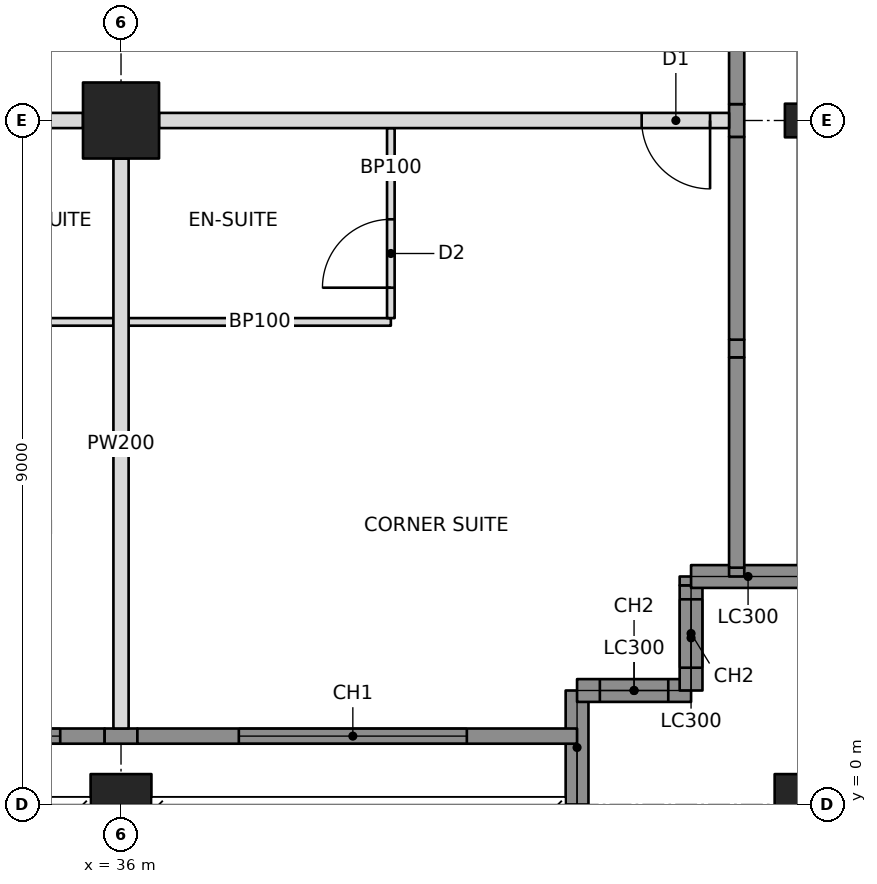
"""IFC4 building model, lengths in metres.
Left out: names, types, materials, properties, quantities, classifications, styles, units other than length and angle.
Written with IfcOpenShell. Run it as: python <this file> out.ifc"""

import sys

from ifc_helpers import new_model, si_unit, direction, frame, frame_2d, origin, origin_2d, place, context, subcontext, project, spatial, rectangle, hollow_rectangle, i_section, extrude, element, fill, save


model = new_model("IFC4")
c1 = context("Model", 3, precision=1e-05, world=origin(), true_north=direction((0.0, 1.0)))
c2 = subcontext(c1, "Body", "Model", "MODEL_VIEW")
j1 = project(units=[si_unit("LENGTHUNIT", "METRE"), si_unit("PLANEANGLEUNIT", "RADIAN")], contexts=[c1])
p1 = place(None, origin())
s1 = spatial("IfcSite", under=j1, at=p1, CompositionType="ELEMENT")
p2 = place(p1, origin())
s2 = spatial("IfcBuilding", under=s1, at=p2, CompositionType="ELEMENT")
p3 = place(p2, frame((0.0, 0.0, 152.0)))
s3 = spatial("IfcBuildingStorey", under=s2, at=p3, CompositionType="ELEMENT", Elevation=152.0)
p4 = place(p3, frame((36.0, 0.0, 0.0), z_axis=(0.0, 0.0, 1.0), x_axis=(1.0, 0.0, 0.0)))
e1 = element("IfcColumn", 1, at=p4, inside=s3, PredefinedType="COLUMN", context=c2, shape_type="SweptSolid", body=[
    extrude(hollow_rectangle(XDim=0.8, YDim=0.8, WallThickness=0.06, at=origin_2d()), origin(), (0.0, 0.0, 1.0), 3.4),
])
p5 = place(p3, frame((36.0, 9.0, 0.0), z_axis=(0.0, 0.0, 1.0), x_axis=(0.0, 1.0, 0.0)))
e2 = element("IfcColumn", 2, at=p5, inside=s3, PredefinedType="COLUMN", context=c2, shape_type="SweptSolid", body=[
    extrude(hollow_rectangle(XDim=1.0, YDim=1.0, WallThickness=0.1, at=origin_2d()), origin(), (0.0, 0.0, 1.0), 3.4),
])
p6 = place(p3, frame((45.0, 0.0, 0.0), z_axis=(0.0, 0.0, 1.0), x_axis=(1.0, 0.0, 0.0)))
e3 = element("IfcColumn", 3, at=p6, inside=s3, PredefinedType="COLUMN", context=c2, shape_type="SweptSolid", body=[
    extrude(hollow_rectangle(XDim=0.8, YDim=0.8, WallThickness=0.06, at=origin_2d()), origin(), (0.0, 0.0, 1.0), 3.4),
])
p7 = place(p3, frame((45.0, 9.0, 0.0), z_axis=(0.0, 0.0, 1.0), x_axis=(0.0, 1.0, 0.0)))
e4 = element("IfcColumn", 4, at=p7, inside=s3, PredefinedType="COLUMN", context=c2, shape_type="SweptSolid", body=[
    extrude(i_section(OverallWidth=0.442, OverallDepth=0.531, WebThickness=0.066, FlangeThickness=0.106, at=origin_2d()), origin(), (0.0, 0.0, 1.0), 3.4),
])
p8 = place(p3, frame((42.0, 0.0, 0.0), z_axis=(0.0, 0.0, 1.0), x_axis=(0.0, 1.0, 0.0)))
e5 = element("IfcWall", 5, at=p8, inside=s3, PredefinedType="SOLIDWALL", context=c2, shape_type="SweptSolid", body=[
    extrude(rectangle(XDim=1.5, YDim=0.3, at=frame_2d((0.75, 0.0))), origin(), (0.0, 0.0, 1.0), 2.202),
])
p9 = place(p3, frame((42.0, 1.5, 0.0), z_axis=(0.0, 0.0, 1.0), x_axis=(1.0, 0.0, 0.0)))
e6 = element("IfcWall", 6, at=p9, inside=s3, PredefinedType="SOLIDWALL", context=c2, shape_type="SweptSolid", body=[
    extrude(rectangle(XDim=1.5, YDim=0.3, at=frame_2d((0.75, 0.0))), origin(), (0.0, 0.0, 1.0), 3.15),
])
p10 = place(p9, frame((0.3, 0.0, 0.6)))
e7 = element("IfcOpeningElement", 7, at=p10, cuts=e6, PredefinedType="OPENING", context=c2, shape_type="SweptSolid", body=[
    extrude(rectangle(XDim=0.9, YDim=2.2, at=frame_2d((0.45, 1.1))), frame((0.0, 0.16, 0.0), z_axis=(0.0, -1.0, 0.0), x_axis=(1.0, 0.0, 0.0)), (0.0, 0.0, 1.0), 0.32),
])
p11 = place(p3, frame((43.5, 1.5, 0.0), z_axis=(0.0, 0.0, 1.0), x_axis=(0.0, 1.0, 0.0)))
e8 = element("IfcWall", 8, at=p11, inside=s3, PredefinedType="SOLIDWALL", context=c2, shape_type="SweptSolid", body=[
    extrude(rectangle(XDim=1.384, YDim=0.3, at=frame_2d((0.692, 0.0))), origin(), (0.0, 0.0, 1.0), 3.15),
])
p12 = place(p11, frame((0.3, 0.0, 0.6)))
e9 = element("IfcOpeningElement", 9, at=p12, cuts=e8, PredefinedType="OPENING", context=c2, shape_type="SweptSolid", body=[
    extrude(rectangle(XDim=0.9, YDim=2.2, at=frame_2d((0.45, 1.1))), frame((0.0, 0.16, 0.0), z_axis=(0.0, -1.0, 0.0), x_axis=(1.0, 0.0, 0.0)), (0.0, 0.0, 1.0), 0.32),
])
p13 = place(p3, frame((43.5, 3.0, 0.0), z_axis=(0.0, 0.0, 1.0), x_axis=(1.0, 0.0, 0.0)))
e10 = element("IfcWall", 10, at=p13, inside=s3, PredefinedType="SOLIDWALL", context=c2, shape_type="SweptSolid", body=[
    extrude(rectangle(XDim=1.5, YDim=0.3, at=frame_2d((0.75, 0.0))), origin(), (0.0, 0.0, 1.0), 2.202),
])
p14 = place(p3, frame((44.1, 3.0, 0.0), z_axis=(0.0, 0.0, 1.0), x_axis=(0.0, 1.0, 0.0)))
e11 = element("IfcWall", 11, at=p14, inside=s3, PredefinedType="SOLIDWALL", context=c2, shape_type="SweptSolid", body=[
    extrude(rectangle(XDim=0.116, YDim=0.2, at=frame_2d((0.058, 0.0))), origin(), (0.0, 0.0, 1.0), 2.542),
])
p15 = place(p3, frame((27.5, 9.0, 0.0), z_axis=(0.0, 0.0, 1.0), x_axis=(1.0, 0.0, 0.0)))
e12 = element("IfcWall", 12, at=p15, inside=s3, PredefinedType="PARTITIONING", context=c2, shape_type="SweptSolid", body=[
    extrude(rectangle(XDim=8.0, YDim=0.2, at=frame_2d((4.0, 0.0))), origin(), (0.0, 0.0, 1.0), 2.21),
])
p16 = place(p15, frame((4.25, 0.0, 0.0)))
e13 = element("IfcOpeningElement", 13, at=p16, cuts=e12, PredefinedType="OPENING", context=c2, shape_type="SweptSolid", body=[
    extrude(rectangle(XDim=0.9, YDim=2.1, at=frame_2d((0.45, 1.05))), frame((0.0, 0.11, 0.0), z_axis=(0.0, -1.0, 0.0), x_axis=(1.0, 0.0, 0.0)), (0.0, 0.0, 1.0), 0.22),
])
p17 = place(p3, frame((36.5, 9.0, 0.0), z_axis=(0.0, 0.0, 1.0), x_axis=(1.0, 0.0, 0.0)))
e14 = element("IfcWall", 14, at=p17, inside=s3, PredefinedType="PARTITIONING", context=c2, shape_type="SweptSolid", body=[
    extrude(rectangle(XDim=7.5, YDim=0.2, at=frame_2d((3.75, 0.0))), origin(), (0.0, 0.0, 1.0), 2.21),
])
p18 = place(p17, frame((6.35, 0.0, 0.0)))
e15 = element("IfcOpeningElement", 15, at=p18, cuts=e14, PredefinedType="OPENING", context=c2, shape_type="SweptSolid", body=[
    extrude(rectangle(XDim=0.9, YDim=2.1, at=frame_2d((0.45, 1.05))), frame((0.0, 0.11, 0.0), z_axis=(0.0, -1.0, 0.0), x_axis=(1.0, 0.0, 0.0)), (0.0, 0.0, 1.0), 0.22),
])
p19 = place(p3, frame((36.0, 8.5, 0.0), z_axis=(0.0, 0.0, 1.0), x_axis=(0.0, -1.0, 0.0)))
e16 = element("IfcWall", 16, at=p19, inside=s3, PredefinedType="PARTITIONING", context=c2, shape_type="SweptSolid", body=[
    extrude(rectangle(XDim=7.5, YDim=0.2, at=frame_2d((3.75, 0.0))), origin(), (0.0, 0.0, 1.0), 2.21),
])
p20 = place(p3, frame((32.95, 6.35, 0.0), z_axis=(0.0, 0.0, 1.0), x_axis=(1.0, 0.0, 0.0)))
e17 = element("IfcWall", 17, at=p20, inside=s3, PredefinedType="PARTITIONING", context=c2, shape_type="SweptSolid", body=[
    extrude(rectangle(XDim=2.95, YDim=0.1, at=frame_2d((1.475, 0.0))), origin(), (0.0, 0.0, 1.0), 2.21),
])
p21 = place(p3, frame((36.1, 6.35, 0.0), z_axis=(0.0, 0.0, 1.0), x_axis=(1.0, 0.0, 0.0)))
e18 = element("IfcWall", 18, at=p21, inside=s3, PredefinedType="PARTITIONING", context=c2, shape_type="SweptSolid", body=[
    extrude(rectangle(XDim=3.45, YDim=0.1, at=frame_2d((1.725, 0.0))), origin(), (0.0, 0.0, 1.0), 2.21),
])
p22 = place(p3, frame((39.55, 8.9, 0.0), z_axis=(0.0, 0.0, 1.0), x_axis=(0.0, -1.0, 0.0)))
e19 = element("IfcWall", 19, at=p22, inside=s3, PredefinedType="PARTITIONING", context=c2, shape_type="SweptSolid", body=[
    extrude(rectangle(XDim=2.5, YDim=0.1, at=frame_2d((1.25, 0.0))), origin(), (0.0, 0.0, 1.0), 2.21),
])
p23 = place(p22, frame((1.2, 0.0, 0.0)))
e20 = element("IfcOpeningElement", 20, at=p23, cuts=e19, PredefinedType="OPENING", context=c2, shape_type="SweptSolid", body=[
    extrude(rectangle(XDim=0.9, YDim=2.1, at=frame_2d((0.45, 1.05))), frame((0.0, 0.06, 0.0), z_axis=(0.0, -1.0, 0.0), x_axis=(1.0, 0.0, 0.0)), (0.0, 0.0, 1.0), 0.12),
])
p24 = place(p3, frame((43.5, 2.884, 0.0), z_axis=(0.0, 0.0, 1.0), x_axis=(0.0, 1.0, 0.0)))
e21 = element("IfcWall", 21, at=p24, inside=s3, PredefinedType="SOLIDWALL", context=c2, shape_type="SweptSolid", body=[
    extrude(rectangle(XDim=0.116, YDim=0.3, at=frame_2d((0.058, 0.0))), origin(), (0.0, 0.0, 1.0), 2.542),
])
p25 = place(p3, frame((27.214, 0.9, 0.0), z_axis=(0.0, 0.0, 1.0), x_axis=(1.0, 0.0, 0.0)))
e22 = element("IfcWall", 22, at=p25, inside=s3, PredefinedType="SOLIDWALL", context=c2, shape_type="SweptSolid", body=[
    extrude(rectangle(XDim=8.571, YDim=0.2, at=frame_2d((4.285, 0.0))), origin(), (0.0, 0.0, 1.0), 3.15),
])
p26 = place(p25, frame((0.586, 0.0, 0.6)))
e23 = element("IfcOpeningElement", 23, at=p26, cuts=e22, PredefinedType="OPENING", context=c2, shape_type="SweptSolid", body=[
    extrude(rectangle(XDim=3.0, YDim=2.2, at=frame_2d((1.5, 1.1))), frame((0.0, 0.11, 0.0), z_axis=(0.0, -1.0, 0.0), x_axis=(1.0, 0.0, 0.0)), (0.0, 0.0, 1.0), 0.22),
])
p27 = place(p25, frame((4.986, 0.0, 0.6)))
e24 = element("IfcOpeningElement", 24, at=p27, cuts=e22, PredefinedType="OPENING", context=c2, shape_type="SweptSolid", body=[
    extrude(rectangle(XDim=3.0, YDim=2.2, at=frame_2d((1.5, 1.1))), frame((0.0, 0.11, 0.0), z_axis=(0.0, -1.0, 0.0), x_axis=(1.0, 0.0, 0.0)), (0.0, 0.0, 1.0), 0.22),
])
p28 = place(p3, frame((35.785, 0.9, 0.0), z_axis=(0.0, 0.0, 1.0), x_axis=(1.0, 0.0, 0.0)))
e25 = element("IfcWall", 25, at=p28, inside=s3, PredefinedType="SOLIDWALL", context=c2, shape_type="SweptSolid", body=[
    extrude(rectangle(XDim=0.431, YDim=0.2, at=frame_2d((0.215, 0.0))), origin(), (0.0, 0.0, 1.0), 2.21),
])
p29 = place(p3, frame((36.215, 0.9, 0.0), z_axis=(0.0, 0.0, 1.0), x_axis=(1.0, 0.0, 0.0)))
e26 = element("IfcWall", 26, at=p29, inside=s3, PredefinedType="SOLIDWALL", context=c2, shape_type="SweptSolid", body=[
    extrude(rectangle(XDim=5.785, YDim=0.2, at=frame_2d((2.892, 0.0))), origin(), (0.0, 0.0, 1.0), 3.15),
])
p30 = place(p29, frame((1.335, 0.0, 0.6)))
e27 = element("IfcOpeningElement", 27, at=p30, cuts=e26, PredefinedType="OPENING", context=c2, shape_type="SweptSolid", body=[
    extrude(rectangle(XDim=3.0, YDim=2.2, at=frame_2d((1.5, 1.1))), frame((0.0, 0.11, 0.0), z_axis=(0.0, -1.0, 0.0), x_axis=(1.0, 0.0, 0.0)), (0.0, 0.0, 1.0), 0.22),
])
p31 = place(p3, frame((44.1, 3.116, 0.0), z_axis=(0.0, 0.0, 1.0), x_axis=(0.0, 1.0, 0.0)))
e28 = element("IfcWall", 28, at=p31, inside=s3, PredefinedType="SOLIDWALL", context=c2, shape_type="SweptSolid", body=[
    extrude(rectangle(XDim=2.768, YDim=0.2, at=frame_2d((1.384, 0.0))), origin(), (0.0, 0.0, 1.0), 3.15),
])
p32 = place(p3, frame((44.1, 5.884, 0.0), z_axis=(0.0, 0.0, 1.0), x_axis=(0.0, 1.0, 0.0)))
e29 = element("IfcWall", 29, at=p32, inside=s3, PredefinedType="SOLIDWALL", context=c2, shape_type="SweptSolid", body=[
    extrude(rectangle(XDim=0.232, YDim=0.2, at=frame_2d((0.116, 0.0))), origin(), (0.0, 0.0, 1.0), 2.542),
])
p33 = place(p3, frame((44.1, 6.116, 0.0), z_axis=(0.0, 0.0, 1.0), x_axis=(0.0, 1.0, 0.0)))
e30 = element("IfcWall", 30, at=p33, inside=s3, PredefinedType="SOLIDWALL", context=c2, shape_type="SweptSolid", body=[
    extrude(rectangle(XDim=2.668, YDim=0.2, at=frame_2d((1.334, 0.0))), origin(), (0.0, 0.0, 1.0), 3.15),
])
p34 = place(p3, frame((44.1, 8.785, 0.0), z_axis=(0.0, 0.0, 1.0), x_axis=(0.0, 1.0, 0.0)))
e31 = element("IfcWall", 31, at=p34, inside=s3, PredefinedType="SOLIDWALL", context=c2, shape_type="SweptSolid", body=[
    extrude(rectangle(XDim=0.431, YDim=0.2, at=frame_2d((0.215, 0.0))), origin(), (0.0, 0.0, 1.0), 2.21),
])
p35 = place(p3, frame((44.1, 9.215, 0.0), z_axis=(0.0, 0.0, 1.0), x_axis=(0.0, 1.0, 0.0)))
e32 = element("IfcWall", 32, at=p35, inside=s3, PredefinedType="SOLIDWALL", context=c2, shape_type="SweptSolid", body=[
    extrude(rectangle(XDim=8.571, YDim=0.2, at=frame_2d((4.285, 0.0))), origin(), (0.0, 0.0, 1.0), 3.15),
])
p36 = place(p35, frame((1.935, 0.0, 0.6)))
e33 = element("IfcOpeningElement", 33, at=p36, cuts=e32, PredefinedType="OPENING", context=c2, shape_type="SweptSolid", body=[
    extrude(rectangle(XDim=3.0, YDim=2.2, at=frame_2d((1.5, 1.1))), frame((0.0, 0.11, 0.0), z_axis=(0.0, -1.0, 0.0), x_axis=(1.0, 0.0, 0.0)), (0.0, 0.0, 1.0), 0.22),
])
p37 = place(p35, frame((5.435, 0.0, 0.6)))
e34 = element("IfcOpeningElement", 34, at=p37, cuts=e32, PredefinedType="OPENING", context=c2, shape_type="SweptSolid", body=[
    extrude(rectangle(XDim=3.0, YDim=2.2, at=frame_2d((1.5, 1.1))), frame((0.0, 0.11, 0.0), z_axis=(0.0, -1.0, 0.0), x_axis=(1.0, 0.0, 0.0)), (0.0, 0.0, 1.0), 0.22),
])
p38 = place(p10, origin())
e35 = element("IfcWindow", 35, at=p38, inside=s3, PartitioningType="SINGLE_PANEL", PredefinedType="WINDOW", context=c2, shape_type="SweptSolid", body=[
    extrude(rectangle(XDim=0.9, YDim=2.2, at=frame_2d((0.45, 1.1))), frame((0.0, 0.03, 0.0), z_axis=(0.0, -1.0, 0.0), x_axis=(1.0, 0.0, 0.0)), (0.0, 0.0, 1.0), 0.06),
])
fill(e7, e35)
p39 = place(p12, origin())
e36 = element("IfcWindow", 36, at=p39, inside=s3, PartitioningType="SINGLE_PANEL", PredefinedType="WINDOW", context=c2, shape_type="SweptSolid", body=[
    extrude(rectangle(XDim=0.9, YDim=2.2, at=frame_2d((0.45, 1.1))), frame((0.0, 0.03, 0.0), z_axis=(0.0, -1.0, 0.0), x_axis=(1.0, 0.0, 0.0)), (0.0, 0.0, 1.0), 0.06),
])
fill(e9, e36)
p40 = place(p27, origin())
e37 = element("IfcWindow", 37, at=p40, inside=s3, PartitioningType="TRIPLE_PANEL_VERTICAL", PredefinedType="WINDOW", context=c2, shape_type="SweptSolid", body=[
    extrude(rectangle(XDim=3.0, YDim=2.2, at=frame_2d((1.5, 1.1))), frame((0.0, 0.03, 0.0), z_axis=(0.0, -1.0, 0.0), x_axis=(1.0, 0.0, 0.0)), (0.0, 0.0, 1.0), 0.06),
])
fill(e24, e37)
p41 = place(p30, origin())
e38 = element("IfcWindow", 38, at=p41, inside=s3, PartitioningType="TRIPLE_PANEL_VERTICAL", PredefinedType="WINDOW", context=c2, shape_type="SweptSolid", body=[
    extrude(rectangle(XDim=3.0, YDim=2.2, at=frame_2d((1.5, 1.1))), frame((0.0, 0.03, 0.0), z_axis=(0.0, -1.0, 0.0), x_axis=(1.0, 0.0, 0.0)), (0.0, 0.0, 1.0), 0.06),
])
fill(e27, e38)
p42 = place(p23, frame((0.9, 0.0, 0.0), z_axis=(0.0, 0.0, 1.0), x_axis=(-1.0, 0.0, 0.0)))
e39 = element("IfcDoor", 39, at=p42, inside=s3, OperationType="SINGLE_SWING_LEFT", PredefinedType="DOOR", context=c2, shape_type="SweptSolid", body=[
    extrude(rectangle(XDim=0.9, YDim=2.1, at=frame_2d((0.45, 1.05))), frame((0.0, 0.025, 0.0), z_axis=(0.0, -1.0, 0.0), x_axis=(1.0, 0.0, 0.0)), (0.0, 0.0, 1.0), 0.05),
])
fill(e20, e39)
p43 = place(p18, frame((0.9, 0.0, 0.0), z_axis=(0.0, 0.0, 1.0), x_axis=(-1.0, 0.0, 0.0)))
e40 = element("IfcDoor", 40, at=p43, inside=s3, OperationType="SINGLE_SWING_LEFT", PredefinedType="DOOR", context=c2, shape_type="SweptSolid", body=[
    extrude(rectangle(XDim=0.9, YDim=2.1, at=frame_2d((0.45, 1.05))), frame((0.0, 0.025, 0.0), z_axis=(0.0, -1.0, 0.0), x_axis=(1.0, 0.0, 0.0)), (0.0, 0.0, 1.0), 0.05),
])
fill(e15, e40)
save(model, sys.argv[1])
